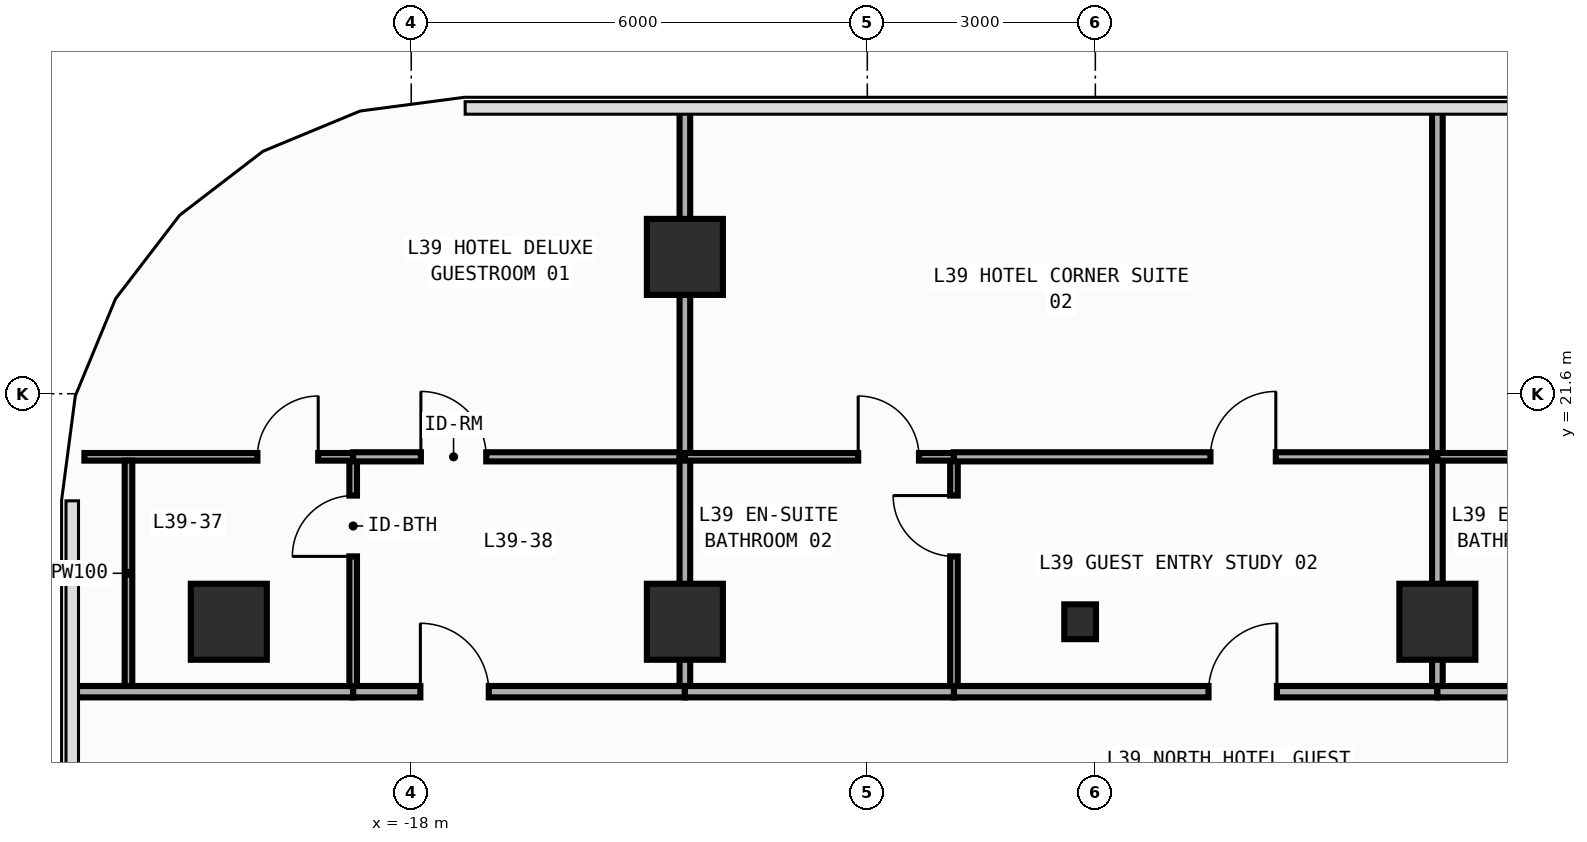
"""IFC4 building model, lengths in metres.
Left out: names, types, materials, properties, quantities, classifications, styles, units other than length and angle.
Written with IfcOpenShell. Run it as: python <this file> out.ifc"""

import sys

from ifc_helpers import new_model, si_unit, direction, frame, frame_2d, origin, origin_2d, place, context, subcontext, project, spatial, rectangle, i_section, extrude, element, fill, save


model = new_model("IFC4")
c1 = context("Model", 3, precision=1e-05, world=origin(), true_north=direction((0.0, 1.0)))
c2 = subcontext(c1, "Body", "Model", "MODEL_VIEW")
j1 = project(units=[si_unit("LENGTHUNIT", "METRE"), si_unit("PLANEANGLEUNIT", "RADIAN")], contexts=[c1])
p1 = place(None, origin())
s1 = spatial("IfcSite", under=j1, at=p1, CompositionType="ELEMENT")
p2 = place(p1, origin())
s2 = spatial("IfcBuilding", under=s1, at=p2, CompositionType="ELEMENT")
p3 = place(p2, frame((0.0, 0.0, 172.6)))
s3 = spatial("IfcBuildingStorey", under=s2, at=p3, CompositionType="ELEMENT", Elevation=172.6)
p4 = place(p3, frame((-9.2, 18.6, 0.0), z_axis=(0.0, 0.0, 1.0), x_axis=(1.0, 0.0, 0.0)))
e1 = element("IfcColumn", 1, at=p4, inside=s3, PredefinedType="COLUMN", context=c2, shape_type="SweptSolid", body=[
    extrude(i_section(OverallWidth=0.417, OverallDepth=0.458, WebThickness=0.03, FlangeThickness=0.05, FilletRadius=0.022, at=origin_2d()), origin(), (0.0, 0.0, 1.0), 3.8),
])
for number, where, z_axis, x_axis in (
    (2, (-20.4, 18.6, 0.0), (0.0, 0.0, 1.0), (1.0, 0.0, 0.0)),
    (3, (-14.4, 18.6, 0.0), (0.0, 0.0, 1.0), (1.0, 0.0, 0.0)),
    (4, (-4.5, 18.6, 0.0), (0.0, 0.0, 1.0), (1.0, 0.0, 0.0)),
    (5, (-14.4, 23.4, 0.0), (0.0, 0.0, 1.0), (1.0, 0.0, 0.0)),
):
    element("IfcColumn", number, at=place(p3, frame(where, z_axis=z_axis, x_axis=x_axis)), inside=s3, PredefinedType="COLUMN", context=c2, shape_type="SweptSolid", body=[
        extrude(rectangle(XDim=1.0, YDim=1.0, at=origin_2d()), origin(), (0.0, 0.0, 1.0), 3.8),
    ])
p5 = place(p3, frame((-22.455, 17.68, 0.0), z_axis=(0.0, 0.0, 1.0), x_axis=(1.0, 0.0, 0.0)))
e6 = element("IfcWall", 6, at=p5, inside=s3, PredefinedType="PARTITIONING", context=c2, shape_type="SweptSolid", body=[
    extrude(rectangle(XDim=3.691, YDim=0.15, at=frame_2d((1.846, 0.0))), origin(), (0.0, 0.0, 1.0), 3.54),
])
p6 = place(p3, frame((-18.764, 17.68, 0.0), z_axis=(0.0, 0.0, 1.0), x_axis=(1.0, 0.0, 0.0)))
e7 = element("IfcWall", 7, at=p6, inside=s3, PredefinedType="PARTITIONING", context=c2, shape_type="SweptSolid", body=[
    extrude(rectangle(XDim=4.364, YDim=0.15, at=frame_2d((2.182, 0.0))), origin(), (0.0, 0.0, 1.0), 3.54),
])
p7 = place(p6, frame((0.884, 0.0, 0.0)))
e8 = element("IfcOpeningElement", 8, at=p7, cuts=e7, PredefinedType="OPENING", context=c2, shape_type="SweptSolid", body=[
    extrude(rectangle(XDim=0.9, YDim=2.15, at=frame_2d((0.45, 1.075))), frame((0.0, 0.085, 0.0), z_axis=(0.0, -1.0, 0.0), x_axis=(1.0, 0.0, 0.0)), (0.0, 0.0, 1.0), 0.17),
])
p8 = place(p3, frame((-14.4, 17.68, 0.0), z_axis=(0.0, 0.0, 1.0), x_axis=(1.0, 0.0, 0.0)))
e9 = element("IfcWall", 9, at=p8, inside=s3, PredefinedType="PARTITIONING", context=c2, shape_type="SweptSolid", body=[
    extrude(rectangle(XDim=3.54, YDim=0.15, at=frame_2d((1.77, 0.0))), origin(), (0.0, 0.0, 1.0), 3.54),
])
p9 = place(p3, frame((-10.86, 17.68, 0.0), z_axis=(0.0, 0.0, 1.0), x_axis=(1.0, 0.0, 0.0)))
e10 = element("IfcWall", 10, at=p9, inside=s3, PredefinedType="PARTITIONING", context=c2, shape_type="SweptSolid", body=[
    extrude(rectangle(XDim=6.36, YDim=0.15, at=frame_2d((3.18, 0.0))), origin(), (0.0, 0.0, 1.0), 3.54),
])
p10 = place(p9, frame((3.349, 0.0, 0.0)))
e11 = element("IfcOpeningElement", 11, at=p10, cuts=e10, PredefinedType="OPENING", context=c2, shape_type="SweptSolid", body=[
    extrude(rectangle(XDim=0.9, YDim=2.15, at=frame_2d((0.45, 1.075))), frame((0.0, 0.085, 0.0), z_axis=(0.0, -1.0, 0.0), x_axis=(1.0, 0.0, 0.0)), (0.0, 0.0, 1.0), 0.17),
])
p11 = place(p3, frame((-4.5, 17.68, 0.0), z_axis=(0.0, 0.0, 1.0), x_axis=(1.0, 0.0, 0.0)))
e12 = element("IfcWall", 12, at=p11, inside=s3, PredefinedType="PARTITIONING", context=c2, shape_type="SweptSolid", body=[
    extrude(rectangle(XDim=3.54, YDim=0.15, at=frame_2d((1.77, 0.0))), origin(), (0.0, 0.0, 1.0), 3.54),
])
p12 = place(p3, frame((-18.764, 17.755, 0.0), z_axis=(0.0, 0.0, 1.0), x_axis=(0.0, 1.0, 0.0)))
e13 = element("IfcWall", 13, at=p12, inside=s3, PredefinedType="PARTITIONING", context=c2, shape_type="SweptSolid", body=[
    extrude(rectangle(XDim=2.965, YDim=0.1, at=frame_2d((1.482, 0.0))), origin(), (0.0, 0.0, 1.0), 3.54),
])
p13 = place(p12, frame((1.705, 0.0, 0.0)))
e14 = element("IfcOpeningElement", 14, at=p13, cuts=e13, PredefinedType="OPENING", context=c2, shape_type="SweptSolid", body=[
    extrude(rectangle(XDim=0.8, YDim=2.1, at=frame_2d((0.4, 1.05))), frame((0.0, 0.06, 0.0), z_axis=(0.0, -1.0, 0.0), x_axis=(1.0, 0.0, 0.0)), (0.0, 0.0, 1.0), 0.12),
])
p14 = place(p3, frame((-22.3, 20.77, 0.0), z_axis=(0.0, 0.0, 1.0), x_axis=(1.0, 0.0, 0.0)))
e15 = element("IfcWall", 15, at=p14, inside=s3, PredefinedType="PARTITIONING", context=c2, shape_type="SweptSolid", body=[
    extrude(rectangle(XDim=3.536, YDim=0.1, at=frame_2d((1.768, 0.0))), origin(), (0.0, 0.0, 1.0), 3.54),
])
p15 = place(p14, frame((2.276, 0.0, 0.0)))
e16 = element("IfcOpeningElement", 16, at=p15, cuts=e15, PredefinedType="OPENING", context=c2, shape_type="SweptSolid", body=[
    extrude(rectangle(XDim=0.8, YDim=2.1, at=frame_2d((0.4, 1.05))), frame((0.0, 0.06, 0.0), z_axis=(0.0, -1.0, 0.0), x_axis=(1.0, 0.0, 0.0)), (0.0, 0.0, 1.0), 0.12),
])
p16 = place(p3, frame((-18.764, 20.77, 0.0), z_axis=(0.0, 0.0, 1.0), x_axis=(1.0, 0.0, 0.0)))
e17 = element("IfcWall", 17, at=p16, inside=s3, PredefinedType="PARTITIONING", context=c2, shape_type="SweptSolid", body=[
    extrude(rectangle(XDim=4.364, YDim=0.12, at=frame_2d((2.182, 0.0))), origin(), (0.0, 0.0, 1.0), 3.54),
])
p17 = place(p16, frame((0.891, 0.0, 0.0)))
e18 = element("IfcOpeningElement", 18, at=p17, cuts=e17, PredefinedType="OPENING", context=c2, shape_type="SweptSolid", body=[
    extrude(rectangle(XDim=0.86, YDim=2.15, at=frame_2d((0.43, 1.075))), frame((0.0, 0.07, 0.0), z_axis=(0.0, -1.0, 0.0), x_axis=(1.0, 0.0, 0.0)), (0.0, 0.0, 1.0), 0.14),
])
p18 = place(p3, frame((-14.4, 17.755, 0.0), z_axis=(0.0, 0.0, 1.0), x_axis=(0.0, 1.0, 0.0)))
e19 = element("IfcWall", 19, at=p18, inside=s3, PredefinedType="PARTITIONING", context=c2, shape_type="SweptSolid", body=[
    extrude(rectangle(XDim=3.015, YDim=0.14, at=frame_2d((1.508, 0.0))), origin(), (0.0, 0.0, 1.0), 2.952),
])
p19 = place(p3, frame((-14.4, 20.77, 0.0), z_axis=(0.0, 0.0, 1.0), x_axis=(0.0, 1.0, 0.0)))
e20 = element("IfcWall", 20, at=p19, inside=s3, PredefinedType="PARTITIONING", context=c2, shape_type="SweptSolid", body=[
    extrude(rectangle(XDim=4.585, YDim=0.14, at=frame_2d((2.292, 0.0))), origin(), (0.0, 0.0, 1.0), 2.952),
])
p20 = place(p3, frame((-10.86, 17.755, 0.0), z_axis=(0.0, 0.0, 1.0), x_axis=(0.0, 1.0, 0.0)))
e21 = element("IfcWall", 21, at=p20, inside=s3, PredefinedType="PARTITIONING", context=c2, shape_type="SweptSolid", body=[
    extrude(rectangle(XDim=2.965, YDim=0.1, at=frame_2d((1.482, 0.0))), origin(), (0.0, 0.0, 1.0), 3.54),
])
p21 = place(p20, frame((1.705, 0.0, 0.0)))
e22 = element("IfcOpeningElement", 22, at=p21, cuts=e21, PredefinedType="OPENING", context=c2, shape_type="SweptSolid", body=[
    extrude(rectangle(XDim=0.8, YDim=2.1, at=frame_2d((0.4, 1.05))), frame((0.0, 0.06, 0.0), z_axis=(0.0, -1.0, 0.0), x_axis=(1.0, 0.0, 0.0)), (0.0, 0.0, 1.0), 0.12),
])
p22 = place(p3, frame((-14.4, 20.77, 0.0), z_axis=(0.0, 0.0, 1.0), x_axis=(1.0, 0.0, 0.0)))
e23 = element("IfcWall", 23, at=p22, inside=s3, PredefinedType="PARTITIONING", context=c2, shape_type="SweptSolid", body=[
    extrude(rectangle(XDim=3.54, YDim=0.1, at=frame_2d((1.77, 0.0))), origin(), (0.0, 0.0, 1.0), 3.54),
])
p23 = place(p22, frame((2.28, 0.0, 0.0)))
e24 = element("IfcOpeningElement", 24, at=p23, cuts=e23, PredefinedType="OPENING", context=c2, shape_type="SweptSolid", body=[
    extrude(rectangle(XDim=0.8, YDim=2.1, at=frame_2d((0.4, 1.05))), frame((0.0, 0.06, 0.0), z_axis=(0.0, -1.0, 0.0), x_axis=(1.0, 0.0, 0.0)), (0.0, 0.0, 1.0), 0.12),
])
p24 = place(p3, frame((-10.86, 20.77, 0.0), z_axis=(0.0, 0.0, 1.0), x_axis=(1.0, 0.0, 0.0)))
e25 = element("IfcWall", 25, at=p24, inside=s3, PredefinedType="PARTITIONING", context=c2, shape_type="SweptSolid", body=[
    extrude(rectangle(XDim=6.36, YDim=0.12, at=frame_2d((3.18, 0.0))), origin(), (0.0, 0.0, 1.0), 3.54),
])
p25 = place(p24, frame((3.375, 0.0, 0.0)))
e26 = element("IfcOpeningElement", 26, at=p25, cuts=e25, PredefinedType="OPENING", context=c2, shape_type="SweptSolid", body=[
    extrude(rectangle(XDim=0.86, YDim=2.15, at=frame_2d((0.43, 1.075))), frame((0.0, 0.07, 0.0), z_axis=(0.0, -1.0, 0.0), x_axis=(1.0, 0.0, 0.0)), (0.0, 0.0, 1.0), 0.14),
])
p26 = place(p3, frame((-4.5, 17.755, 0.0), z_axis=(0.0, 0.0, 1.0), x_axis=(0.0, 1.0, 0.0)))
e27 = element("IfcWall", 27, at=p26, inside=s3, PredefinedType="PARTITIONING", context=c2, shape_type="SweptSolid", body=[
    extrude(rectangle(XDim=3.015, YDim=0.14, at=frame_2d((1.508, 0.0))), origin(), (0.0, 0.0, 1.0), 3.54),
])
p27 = place(p3, frame((-4.5, 20.77, 0.0), z_axis=(0.0, 0.0, 1.0), x_axis=(0.0, 1.0, 0.0)))
e28 = element("IfcWall", 28, at=p27, inside=s3, PredefinedType="PARTITIONING", context=c2, shape_type="SweptSolid", body=[
    extrude(rectangle(XDim=4.585, YDim=0.14, at=frame_2d((2.292, 0.0))), origin(), (0.0, 0.0, 1.0), 3.54),
])
p28 = place(p3, frame((-4.5, 20.77, 0.0), z_axis=(0.0, 0.0, 1.0), x_axis=(1.0, 0.0, 0.0)))
e29 = element("IfcWall", 29, at=p28, inside=s3, PredefinedType="PARTITIONING", context=c2, shape_type="SweptSolid", body=[
    extrude(rectangle(XDim=3.54, YDim=0.1, at=frame_2d((1.77, 0.0))), origin(), (0.0, 0.0, 1.0), 3.54),
])
p29 = place(p28, frame((1.875, 0.0, 0.0)))
e30 = element("IfcOpeningElement", 30, at=p29, cuts=e29, PredefinedType="OPENING", context=c2, shape_type="SweptSolid", body=[
    extrude(rectangle(XDim=0.8, YDim=2.1, at=frame_2d((0.4, 1.05))), frame((0.0, 0.06, 0.0), z_axis=(0.0, -1.0, 0.0), x_axis=(1.0, 0.0, 0.0)), (0.0, 0.0, 1.0), 0.12),
])
p30 = place(p3, frame((-21.72, 17.755, 0.0), z_axis=(0.0, 0.0, 1.0), x_axis=(0.0, 1.0, 0.0)))
e31 = element("IfcWall", 31, at=p30, inside=s3, PredefinedType="PARTITIONING", context=c2, shape_type="SweptSolid", body=[
    extrude(rectangle(XDim=2.965, YDim=0.1, at=frame_2d((1.482, 0.0))), origin(), (0.0, 0.0, 1.0), 3.54),
])
p31 = place(p7, origin())
e32 = element("IfcDoor", 32, at=p31, inside=s3, OperationType="SINGLE_SWING_LEFT", PredefinedType="DOOR", context=c2, shape_type="SweptSolid", body=[
    extrude(rectangle(XDim=0.9, YDim=2.15, at=frame_2d((0.45, 1.075))), frame((0.0, 0.025, 0.0), z_axis=(0.0, -1.0, 0.0), x_axis=(1.0, 0.0, 0.0)), (0.0, 0.0, 1.0), 0.05),
])
fill(e8, e32)
p32 = place(p10, origin())
e33 = element("IfcDoor", 33, at=p32, inside=s3, OperationType="SINGLE_SWING_RIGHT", PredefinedType="DOOR", context=c2, shape_type="SweptSolid", body=[
    extrude(rectangle(XDim=0.9, YDim=2.15, at=frame_2d((0.45, 1.075))), frame((0.0, 0.025, 0.0), z_axis=(0.0, -1.0, 0.0), x_axis=(1.0, 0.0, 0.0)), (0.0, 0.0, 1.0), 0.05),
])
fill(e11, e33)
p33 = place(p13, origin())
e34 = element("IfcDoor", 34, at=p33, inside=s3, OperationType="SINGLE_SWING_LEFT", PredefinedType="DOOR", context=c2, shape_type="SweptSolid", body=[
    extrude(rectangle(XDim=0.8, YDim=2.1, at=frame_2d((0.4, 1.05))), frame((0.0, 0.025, 0.0), z_axis=(0.0, -1.0, 0.0), x_axis=(1.0, 0.0, 0.0)), (0.0, 0.0, 1.0), 0.05),
])
fill(e14, e34)
p34 = place(p15, origin())
e35 = element("IfcDoor", 35, at=p34, inside=s3, OperationType="SINGLE_SWING_RIGHT", PredefinedType="DOOR", context=c2, shape_type="SweptSolid", body=[
    extrude(rectangle(XDim=0.8, YDim=2.1, at=frame_2d((0.4, 1.05))), frame((0.0, 0.025, 0.0), z_axis=(0.0, -1.0, 0.0), x_axis=(1.0, 0.0, 0.0)), (0.0, 0.0, 1.0), 0.05),
])
fill(e16, e35)
p35 = place(p17, origin())
e36 = element("IfcDoor", 36, at=p35, inside=s3, OperationType="SINGLE_SWING_LEFT", PredefinedType="DOOR", context=c2, shape_type="SweptSolid", body=[
    extrude(rectangle(XDim=0.86, YDim=2.15, at=frame_2d((0.43, 1.075))), frame((0.0, 0.025, 0.0), z_axis=(0.0, -1.0, 0.0), x_axis=(1.0, 0.0, 0.0)), (0.0, 0.0, 1.0), 0.05),
])
fill(e18, e36)
p36 = place(p21, origin())
e37 = element("IfcDoor", 37, at=p36, inside=s3, OperationType="SINGLE_SWING_RIGHT", PredefinedType="DOOR", context=c2, shape_type="SweptSolid", body=[
    extrude(rectangle(XDim=0.8, YDim=2.1, at=frame_2d((0.4, 1.05))), frame((0.0, 0.025, 0.0), z_axis=(0.0, -1.0, 0.0), x_axis=(1.0, 0.0, 0.0)), (0.0, 0.0, 1.0), 0.05),
])
fill(e22, e37)
p37 = place(p23, origin())
e38 = element("IfcDoor", 38, at=p37, inside=s3, OperationType="SINGLE_SWING_LEFT", PredefinedType="DOOR", context=c2, shape_type="SweptSolid", body=[
    extrude(rectangle(XDim=0.8, YDim=2.1, at=frame_2d((0.4, 1.05))), frame((0.0, 0.025, 0.0), z_axis=(0.0, -1.0, 0.0), x_axis=(1.0, 0.0, 0.0)), (0.0, 0.0, 1.0), 0.05),
])
fill(e24, e38)
p38 = place(p25, origin())
e39 = element("IfcDoor", 39, at=p38, inside=s3, OperationType="SINGLE_SWING_RIGHT", PredefinedType="DOOR", context=c2, shape_type="SweptSolid", body=[
    extrude(rectangle(XDim=0.86, YDim=2.15, at=frame_2d((0.43, 1.075))), frame((0.0, 0.025, 0.0), z_axis=(0.0, -1.0, 0.0), x_axis=(1.0, 0.0, 0.0)), (0.0, 0.0, 1.0), 0.05),
])
fill(e26, e39)
save(model, sys.argv[1])
